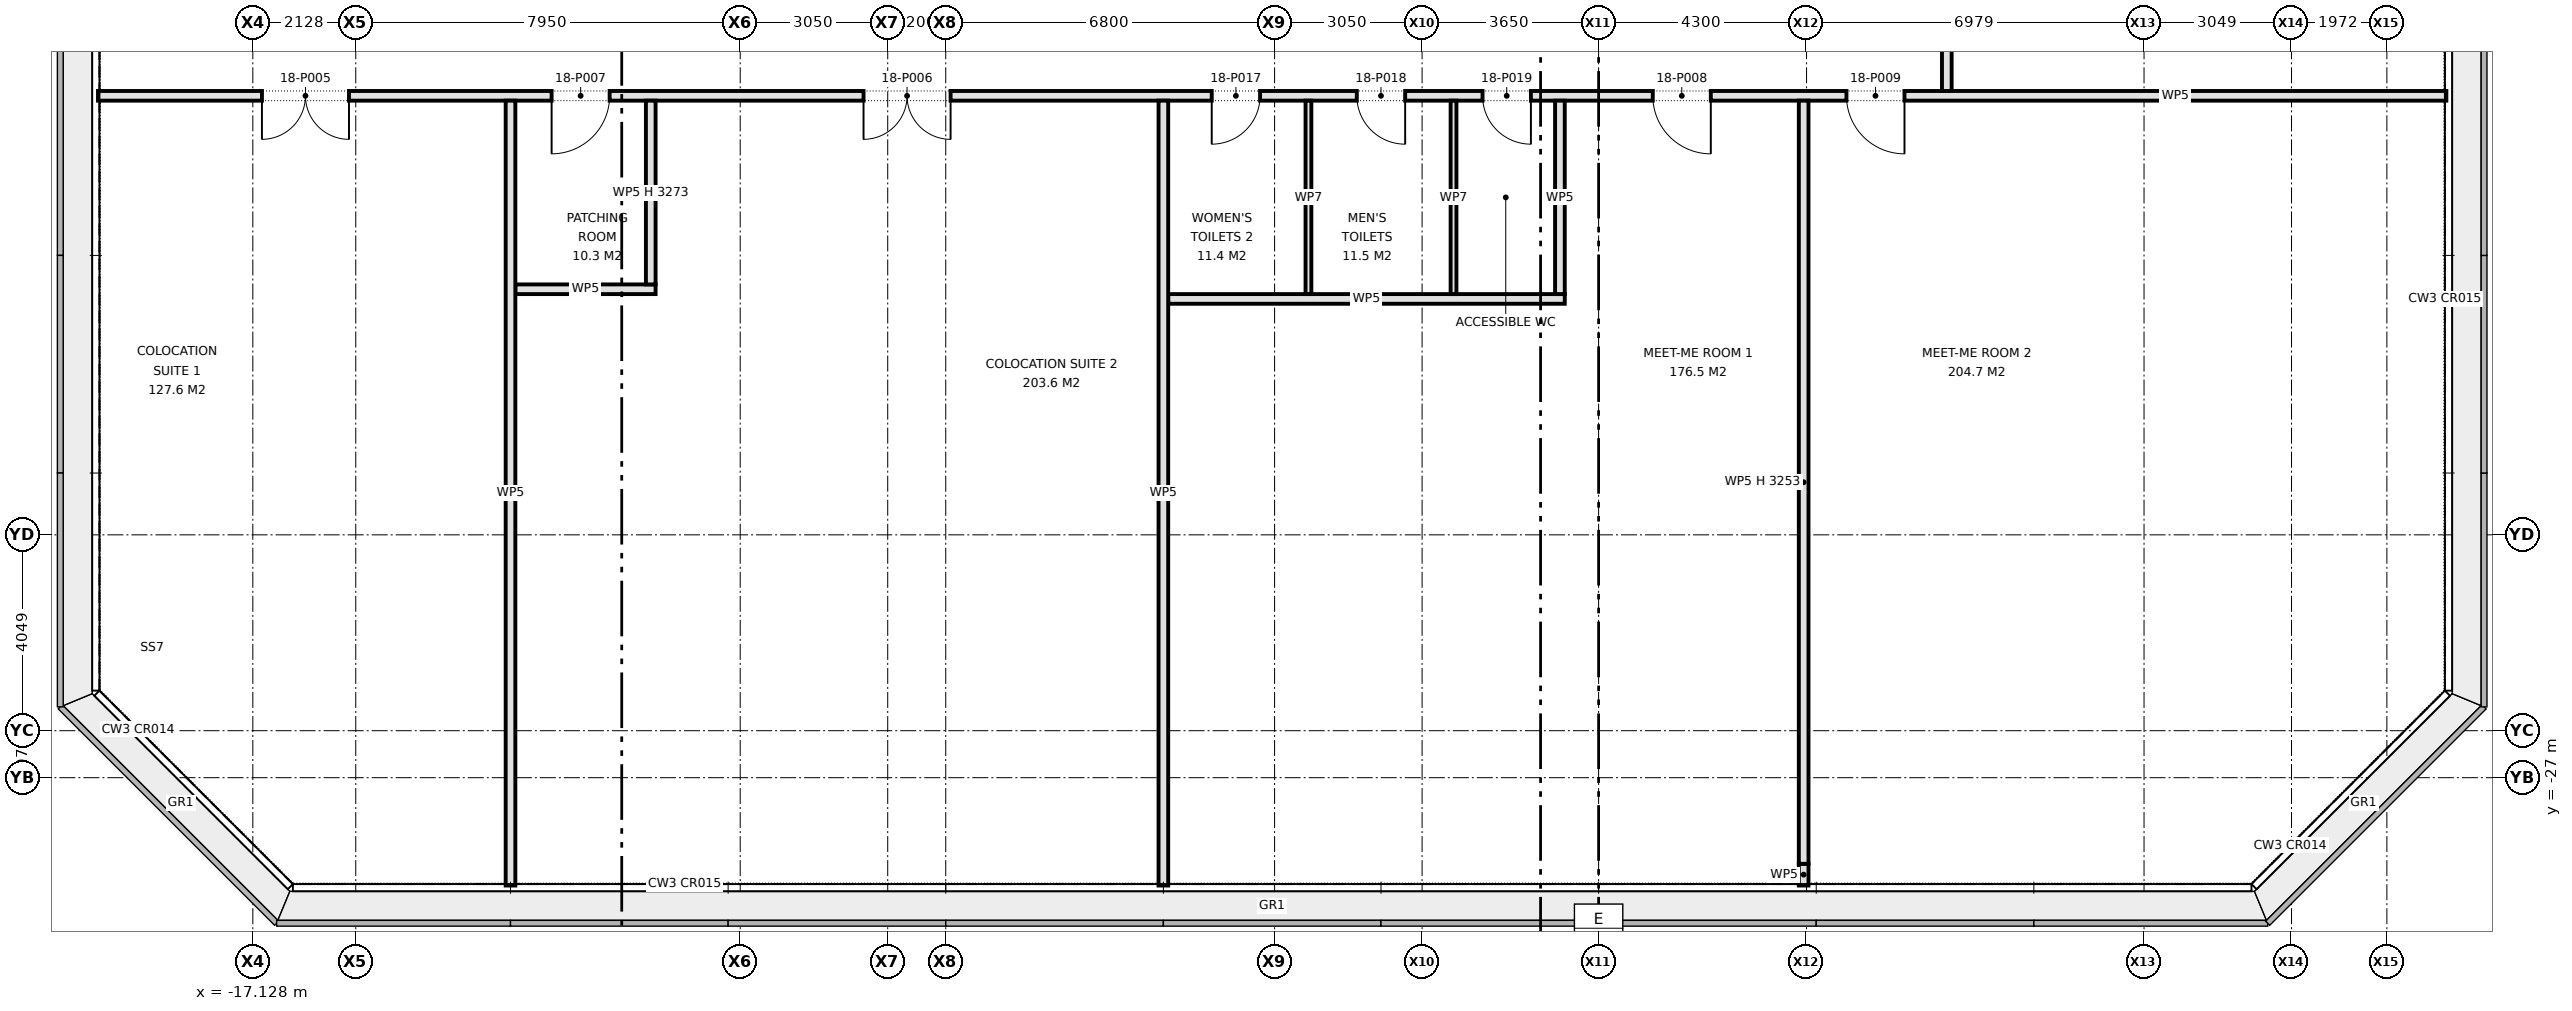
"""IFC4 building model, lengths in metres.
Left out: names, types, materials, properties, quantities, classifications, styles, units other than length and angle.
Written with IfcOpenShell. Run it as: python <this file> out.ifc"""

import sys

from ifc_helpers import new_model, si_unit, direction, frame, frame_2d, origin, place, context, subcontext, project, spatial, rectangle, extrude, element, fill, save


model = new_model("IFC4")
c1 = context("Model", 3, precision=1e-05, world=origin(), true_north=direction((0.0, 1.0)))
c2 = subcontext(c1, "Body", "Model", "MODEL_VIEW")
j1 = project(units=[si_unit("LENGTHUNIT", "METRE"), si_unit("PLANEANGLEUNIT", "RADIAN")], contexts=[c1])
p1 = place(None, origin())
s1 = spatial("IfcSite", under=j1, at=p1, CompositionType="ELEMENT")
p2 = place(p1, origin())
s2 = spatial("IfcBuilding", under=s1, at=p2, CompositionType="ELEMENT")
p3 = place(p2, frame((0.0, 0.0, 82.0)))
s3 = spatial("IfcBuildingStorey", under=s2, at=p3, CompositionType="ELEMENT", Elevation=82.0)
p4 = place(p3, frame((1.8, -17.1, 0.0), z_axis=(0.0, 0.0, 1.0), x_axis=(1.0, 0.0, 0.0)))
e1 = element("IfcWall", 1, at=p4, inside=s3, PredefinedType="PARTITIONING", context=c2, shape_type="SweptSolid", body=[
    extrude(rectangle(XDim=8.2, YDim=0.2, at=frame_2d((4.1, 0.0))), origin(), (0.0, 0.0, 1.0), 4.2),
])
p5 = place(p3, frame((-11.7, -16.9, 0.0), z_axis=(0.0, 0.0, 1.0), x_axis=(1.0, 0.0, 0.0)))
e2 = element("IfcWall", 2, at=p5, inside=s3, PredefinedType="PARTITIONING", context=c2, shape_type="SweptSolid", body=[
    extrude(rectangle(XDim=2.9, YDim=0.2, at=frame_2d((1.45, 0.0))), origin(), (0.0, 0.0, 1.0), 4.2),
])
p6 = place(p3, frame((-20.33, -12.9, 0.0), z_axis=(0.0, 0.0, 1.0), x_axis=(1.0, 0.0, 0.0)))
e3 = element("IfcWall", 3, at=p6, inside=s3, PredefinedType="PARTITIONING", context=c2, shape_type="SweptSolid", body=[
    extrude(rectangle(XDim=48.56, YDim=0.2, at=frame_2d((24.28, 0.0))), origin(), (0.0, 0.0, 1.0), 4.2),
])
p7 = place(p6, frame((3.39, 0.0, 0.0)))
e4 = element("IfcOpeningElement", 4, at=p7, cuts=e3, PredefinedType="OPENING", context=c2, shape_type="SweptSolid", body=[
    extrude(rectangle(XDim=1.8, YDim=2.1, at=frame_2d((0.9, 1.05))), frame((0.0, 0.11, 0.0), z_axis=(0.0, -1.0, 0.0), x_axis=(1.0, 0.0, 0.0)), (0.0, 0.0, 1.0), 0.22),
])
p8 = place(p6, frame((15.83, 0.0, 0.0)))
e5 = element("IfcOpeningElement", 5, at=p8, cuts=e3, PredefinedType="OPENING", context=c2, shape_type="SweptSolid", body=[
    extrude(rectangle(XDim=1.8, YDim=2.1, at=frame_2d((0.9, 1.05))), frame((0.0, 0.11, 0.0), z_axis=(0.0, -1.0, 0.0), x_axis=(1.0, 0.0, 0.0)), (0.0, 0.0, 1.0), 0.22),
])
p9 = place(p6, frame((9.38, 0.0, 0.0)))
e6 = element("IfcOpeningElement", 6, at=p9, cuts=e3, PredefinedType="OPENING", context=c2, shape_type="SweptSolid", body=[
    extrude(rectangle(XDim=1.2, YDim=2.1, at=frame_2d((0.6, 1.05))), frame((0.0, 0.11, 0.0), z_axis=(0.0, -1.0, 0.0), x_axis=(1.0, 0.0, 0.0)), (0.0, 0.0, 1.0), 0.22),
])
p10 = place(p6, frame((32.15, 0.0, 0.0)))
e7 = element("IfcOpeningElement", 7, at=p10, cuts=e3, PredefinedType="OPENING", context=c2, shape_type="SweptSolid", body=[
    extrude(rectangle(XDim=1.2, YDim=2.1, at=frame_2d((0.6, 1.05))), frame((0.0, 0.11, 0.0), z_axis=(0.0, -1.0, 0.0), x_axis=(1.0, 0.0, 0.0)), (0.0, 0.0, 1.0), 0.22),
])
p11 = place(p6, frame((36.155, 0.0, 0.0)))
e8 = element("IfcOpeningElement", 8, at=p11, cuts=e3, PredefinedType="OPENING", context=c2, shape_type="SweptSolid", body=[
    extrude(rectangle(XDim=1.2, YDim=2.1, at=frame_2d((0.6, 1.05))), frame((0.0, 0.11, 0.0), z_axis=(0.0, -1.0, 0.0), x_axis=(1.0, 0.0, 0.0)), (0.0, 0.0, 1.0), 0.22),
])
p12 = place(p6, frame((23.03, 0.0, 0.0)))
e9 = element("IfcOpeningElement", 9, at=p12, cuts=e3, PredefinedType="OPENING", context=c2, shape_type="SweptSolid", body=[
    extrude(rectangle(XDim=1.0, YDim=2.1, at=frame_2d((0.5, 1.05))), frame((0.0, 0.11, 0.0), z_axis=(0.0, -1.0, 0.0), x_axis=(1.0, 0.0, 0.0)), (0.0, 0.0, 1.0), 0.22),
])
p13 = place(p6, frame((26.03, 0.0, 0.0)))
e10 = element("IfcOpeningElement", 10, at=p13, cuts=e3, PredefinedType="OPENING", context=c2, shape_type="SweptSolid", body=[
    extrude(rectangle(XDim=1.0, YDim=2.1, at=frame_2d((0.5, 1.05))), frame((0.0, 0.11, 0.0), z_axis=(0.0, -1.0, 0.0), x_axis=(1.0, 0.0, 0.0)), (0.0, 0.0, 1.0), 0.22),
])
p14 = place(p6, frame((28.63, 0.0, 0.0)))
e11 = element("IfcOpeningElement", 11, at=p14, cuts=e3, PredefinedType="OPENING", context=c2, shape_type="SweptSolid", body=[
    extrude(rectangle(XDim=1.0, YDim=2.1, at=frame_2d((0.5, 1.05))), frame((0.0, 0.11, 0.0), z_axis=(0.0, -1.0, 0.0), x_axis=(1.0, 0.0, 0.0)), (0.0, 0.0, 1.0), 0.22),
])
p15 = place(p3, frame((17.9, -12.8, 0.0), z_axis=(0.0, 0.0, 1.0), x_axis=(0.0, 1.0, 0.0)))
e12 = element("IfcWall", 12, at=p15, inside=s3, PredefinedType="PARTITIONING", context=c2, shape_type="SweptSolid", body=[
    extrude(rectangle(XDim=25.6, YDim=0.2, at=frame_2d((12.8, 0.0))), origin(), (0.0, 0.0, 1.0), 4.2),
])
p16 = place(p15, frame((4.4, 0.0, 0.0)))
e13 = element("IfcOpeningElement", 13, at=p16, cuts=e12, PredefinedType="OPENING", context=c2, shape_type="SweptSolid", body=[
    extrude(rectangle(XDim=1.2, YDim=2.1, at=frame_2d((0.6, 1.05))), frame((0.0, 0.11, 0.0), z_axis=(0.0, -1.0, 0.0), x_axis=(1.0, 0.0, 0.0)), (0.0, 0.0, 1.0), 0.22),
])
p17 = place(p15, frame((15.95, 0.0, 0.0)))
e14 = element("IfcOpeningElement", 14, at=p17, cuts=e12, PredefinedType="OPENING", context=c2, shape_type="SweptSolid", body=[
    extrude(rectangle(XDim=1.8, YDim=2.1, at=frame_2d((0.9, 1.05))), frame((0.0, 0.11, 0.0), z_axis=(0.0, -1.0, 0.0), x_axis=(1.0, 0.0, 0.0)), (0.0, 0.0, 1.0), 0.22),
])
p18 = place(p3, frame((14.94, -29.23, 0.0), z_axis=(0.0, 0.0, 1.0), x_axis=(0.0, 1.0, 0.0)))
e15 = element("IfcWall", 15, at=p18, inside=s3, PredefinedType="PARTITIONING", context=c2, shape_type="SweptSolid", body=[
    extrude(rectangle(XDim=0.449, YDim=0.2, at=frame_2d((0.225, 0.0))), origin(), (0.0, 0.0, 1.0), 4.2),
])
p19 = place(p3, frame((14.94, -28.781, 0.0), z_axis=(0.0, 0.0, 1.0), x_axis=(0.0, 1.0, 0.0)))
e16 = element("IfcWall", 16, at=p19, inside=s3, PredefinedType="PARTITIONING", context=c2, shape_type="SweptSolid", body=[
    extrude(rectangle(XDim=15.781, YDim=0.2, at=frame_2d((7.891, 0.0))), origin(), (0.0, 0.0, 1.0), 3.253),
])
p20 = place(p3, frame((9.9, -17.0, 0.0), z_axis=(0.0, 0.0, 1.0), x_axis=(0.0, 1.0, 0.0)))
e17 = element("IfcWall", 17, at=p20, inside=s3, PredefinedType="PARTITIONING", context=c2, shape_type="SweptSolid", body=[
    extrude(rectangle(XDim=4.0, YDim=0.2, at=frame_2d((2.0, 0.0))), origin(), (0.0, 0.0, 1.0), 4.2),
])
p21 = place(p3, frame((1.7, -29.23, 0.0), z_axis=(0.0, 0.0, 1.0), x_axis=(0.0, 1.0, 0.0)))
e18 = element("IfcWall", 18, at=p21, inside=s3, PredefinedType="PARTITIONING", context=c2, shape_type="SweptSolid", body=[
    extrude(rectangle(XDim=16.23, YDim=0.2, at=frame_2d((8.115, 0.0))), origin(), (0.0, 0.0, 1.0), 4.2),
])
p22 = place(p3, frame((-8.9, -16.8, 0.0), z_axis=(0.0, 0.0, 1.0), x_axis=(0.0, 1.0, 0.0)))
e19 = element("IfcWall", 19, at=p22, inside=s3, PredefinedType="PARTITIONING", context=c2, shape_type="SweptSolid", body=[
    extrude(rectangle(XDim=3.8, YDim=0.2, at=frame_2d((1.9, 0.0))), origin(), (0.0, 0.0, 1.0), 3.273),
])
p23 = place(p3, frame((-11.8, -29.23, 0.0), z_axis=(0.0, 0.0, 1.0), x_axis=(0.0, 1.0, 0.0)))
e20 = element("IfcWall", 20, at=p23, inside=s3, PredefinedType="PARTITIONING", context=c2, shape_type="SweptSolid", body=[
    extrude(rectangle(XDim=16.23, YDim=0.2, at=frame_2d((8.115, 0.0))), origin(), (0.0, 0.0, 1.0), 4.2),
])
for number, where, z_axis, x_axis in (
    (21, (7.7, -17.0, 0.0), (0.0, 0.0, 1.0), (0.0, 1.0, 0.0)),
    (22, (4.7, -17.0, 0.0), (0.0, 0.0, 1.0), (0.0, 1.0, 0.0)),
):
    element("IfcWall", number, at=place(p3, frame(where, z_axis=z_axis, x_axis=x_axis)), inside=s3, PredefinedType="PARTITIONING", context=c2, shape_type="SweptSolid", body=[
        extrude(rectangle(XDim=4.0, YDim=0.12, at=frame_2d((2.0, 0.0))), origin(), (0.0, 0.0, 1.0), 4.2),
    ])
p24 = place(p7, frame((1.8, 0.0, 0.0), z_axis=(0.0, 0.0, 1.0), x_axis=(-1.0, 0.0, 0.0)))
e23 = element("IfcDoor", 23, at=p24, inside=s3, OperationType="DOUBLE_DOOR_SINGLE_SWING", PredefinedType="DOOR", context=c2, shape_type="SweptSolid", body=[
    extrude(rectangle(XDim=1.8, YDim=2.1, at=frame_2d((0.9, 1.05))), frame((0.0, 0.025, 0.0), z_axis=(0.0, -1.0, 0.0), x_axis=(1.0, 0.0, 0.0)), (0.0, 0.0, 1.0), 0.05),
])
fill(e4, e23)
p25 = place(p8, frame((1.8, 0.0, 0.0), z_axis=(0.0, 0.0, 1.0), x_axis=(-1.0, 0.0, 0.0)))
e24 = element("IfcDoor", 24, at=p25, inside=s3, OperationType="DOUBLE_DOOR_SINGLE_SWING", PredefinedType="DOOR", context=c2, shape_type="SweptSolid", body=[
    extrude(rectangle(XDim=1.8, YDim=2.1, at=frame_2d((0.9, 1.05))), frame((0.0, 0.025, 0.0), z_axis=(0.0, -1.0, 0.0), x_axis=(1.0, 0.0, 0.0)), (0.0, 0.0, 1.0), 0.05),
])
fill(e5, e24)
p26 = place(p9, frame((1.2, 0.0, 0.0), z_axis=(0.0, 0.0, 1.0), x_axis=(-1.0, 0.0, 0.0)))
e25 = element("IfcDoor", 25, at=p26, inside=s3, OperationType="SINGLE_SWING_RIGHT", PredefinedType="DOOR", context=c2, shape_type="SweptSolid", body=[
    extrude(rectangle(XDim=1.2, YDim=2.1, at=frame_2d((0.6, 1.05))), frame((0.0, 0.025, 0.0), z_axis=(0.0, -1.0, 0.0), x_axis=(1.0, 0.0, 0.0)), (0.0, 0.0, 1.0), 0.05),
])
fill(e6, e25)
p27 = place(p10, frame((1.2, 0.0, 0.0), z_axis=(0.0, 0.0, 1.0), x_axis=(-1.0, 0.0, 0.0)))
e26 = element("IfcDoor", 26, at=p27, inside=s3, OperationType="SINGLE_SWING_LEFT", PredefinedType="DOOR", context=c2, shape_type="SweptSolid", body=[
    extrude(rectangle(XDim=1.2, YDim=2.1, at=frame_2d((0.6, 1.05))), frame((0.0, 0.025, 0.0), z_axis=(0.0, -1.0, 0.0), x_axis=(1.0, 0.0, 0.0)), (0.0, 0.0, 1.0), 0.05),
])
fill(e7, e26)
p28 = place(p11, frame((1.2, 0.0, 0.0), z_axis=(0.0, 0.0, 1.0), x_axis=(-1.0, 0.0, 0.0)))
e27 = element("IfcDoor", 27, at=p28, inside=s3, OperationType="SINGLE_SWING_LEFT", PredefinedType="DOOR", context=c2, shape_type="SweptSolid", body=[
    extrude(rectangle(XDim=1.2, YDim=2.1, at=frame_2d((0.6, 1.05))), frame((0.0, 0.025, 0.0), z_axis=(0.0, -1.0, 0.0), x_axis=(1.0, 0.0, 0.0)), (0.0, 0.0, 1.0), 0.05),
])
fill(e8, e27)
p29 = place(p12, frame((1.0, 0.0, 0.0), z_axis=(0.0, 0.0, 1.0), x_axis=(-1.0, 0.0, 0.0)))
e28 = element("IfcDoor", 28, at=p29, inside=s3, OperationType="SINGLE_SWING_RIGHT", PredefinedType="DOOR", context=c2, shape_type="SweptSolid", body=[
    extrude(rectangle(XDim=1.0, YDim=2.1, at=frame_2d((0.5, 1.05))), frame((0.0, 0.025, 0.0), z_axis=(0.0, -1.0, 0.0), x_axis=(1.0, 0.0, 0.0)), (0.0, 0.0, 1.0), 0.05),
])
fill(e9, e28)
p30 = place(p13, frame((1.0, 0.0, 0.0), z_axis=(0.0, 0.0, 1.0), x_axis=(-1.0, 0.0, 0.0)))
e29 = element("IfcDoor", 29, at=p30, inside=s3, OperationType="SINGLE_SWING_LEFT", PredefinedType="DOOR", context=c2, shape_type="SweptSolid", body=[
    extrude(rectangle(XDim=1.0, YDim=2.1, at=frame_2d((0.5, 1.05))), frame((0.0, 0.025, 0.0), z_axis=(0.0, -1.0, 0.0), x_axis=(1.0, 0.0, 0.0)), (0.0, 0.0, 1.0), 0.05),
])
fill(e10, e29)
p31 = place(p14, frame((1.0, 0.0, 0.0), z_axis=(0.0, 0.0, 1.0), x_axis=(-1.0, 0.0, 0.0)))
e30 = element("IfcDoor", 30, at=p31, inside=s3, OperationType="SINGLE_SWING_LEFT", PredefinedType="DOOR", context=c2, shape_type="SweptSolid", body=[
    extrude(rectangle(XDim=1.0, YDim=2.1, at=frame_2d((0.5, 1.05))), frame((0.0, 0.025, 0.0), z_axis=(0.0, -1.0, 0.0), x_axis=(1.0, 0.0, 0.0)), (0.0, 0.0, 1.0), 0.05),
])
fill(e11, e30)
save(model, sys.argv[1])
